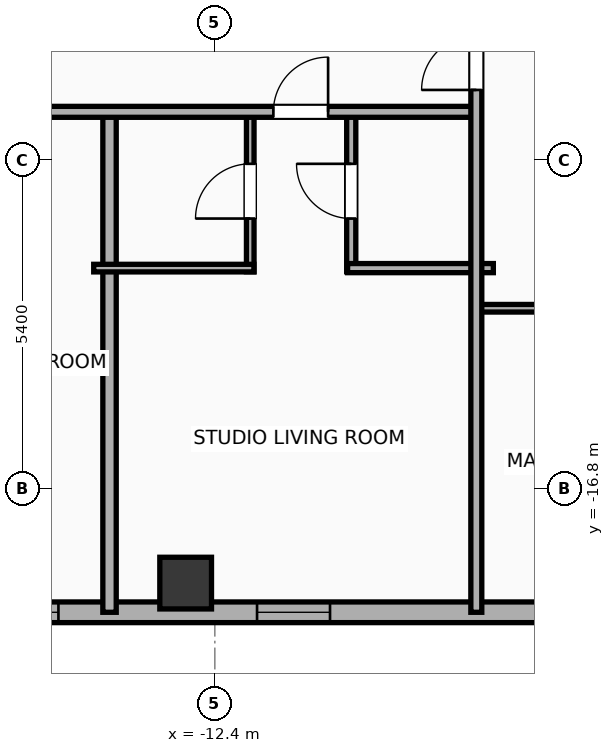
"""IFC4 building model, lengths in metres.
Left out: names, types, materials, properties, quantities, classifications, styles, units other than length and angle.
Written with IfcOpenShell. Run it as: python <this file> out.ifc"""

import sys

from ifc_helpers import new_model, si_unit, direction, frame, frame_2d, origin, origin_2d, place, context, subcontext, project, spatial, rectangle, hollow_rectangle, extrude, element, fill, save


model = new_model("IFC4")
c1 = context("Model", 3, precision=1e-05, world=origin(), true_north=direction((0.0, 1.0)))
c2 = subcontext(c1, "Body", "Model", "MODEL_VIEW")
j1 = project(units=[si_unit("LENGTHUNIT", "METRE"), si_unit("PLANEANGLEUNIT", "RADIAN")], contexts=[c1])
p1 = place(None, origin())
s1 = spatial("IfcSite", under=j1, at=p1, CompositionType="ELEMENT")
p2 = place(p1, origin())
s2 = spatial("IfcBuilding", under=s1, at=p2, CompositionType="ELEMENT")
p3 = place(p2, frame((0.0, 0.0, 247.0)))
s3 = spatial("IfcBuildingStorey", under=s2, at=p3, CompositionType="ELEMENT", Elevation=247.0)
p4 = place(p3, frame((-12.88, -18.35, 0.0), z_axis=(0.0, 0.0, 1.0), x_axis=(1.0, 0.0, 0.0)))
e1 = element("IfcColumn", 1, at=p4, inside=s3, PredefinedType="COLUMN", context=c2, shape_type="SweptSolid", body=[
    extrude(hollow_rectangle(XDim=0.85, YDim=0.85, WallThickness=0.028, at=origin_2d()), origin(), (0.0, 0.0, 1.0), 3.9),
])
p5 = place(p3, frame((26.783, -18.83, 0.0), z_axis=(0.0, 0.0, 1.0), x_axis=(-1.0, 0.0, 0.0)))
e2 = element("IfcWall", 2, at=p5, inside=s3, PredefinedType="ELEMENTEDWALL", context=c2, shape_type="SweptSolid", body=[
    extrude(rectangle(XDim=49.566, YDim=0.34, at=frame_2d((24.783, 0.0))), origin(), (0.0, 0.0, 1.0), 3.65),
])
p6 = place(p5, frame((23.583, 0.0, 0.75)))
e3 = element("IfcOpeningElement", 3, at=p6, cuts=e2, PredefinedType="OPENING", context=c2, shape_type="SweptSolid", body=[
    extrude(rectangle(XDim=2.4, YDim=2.1, at=frame_2d((1.2, 1.05))), frame((0.0, 0.18, 0.0), z_axis=(0.0, -1.0, 0.0), x_axis=(1.0, 0.0, 0.0)), (0.0, 0.0, 1.0), 0.36),
])
p7 = place(p5, frame((41.756, 0.0, 0.75)))
e4 = element("IfcOpeningElement", 4, at=p7, cuts=e2, PredefinedType="OPENING", context=c2, shape_type="SweptSolid", body=[
    extrude(rectangle(XDim=2.4, YDim=2.1, at=frame_2d((1.2, 1.05))), frame((0.0, 0.18, 0.0), z_axis=(0.0, -1.0, 0.0), x_axis=(1.0, 0.0, 0.0)), (0.0, 0.0, 1.0), 0.36),
])
p8 = place(p5, frame((47.222, 0.0, 0.75)))
e5 = element("IfcOpeningElement", 5, at=p8, cuts=e2, PredefinedType="OPENING", context=c2, shape_type="SweptSolid", body=[
    extrude(rectangle(XDim=1.2, YDim=2.05, at=frame_2d((0.6, 1.025))), frame((0.0, 0.18, 0.0), z_axis=(0.0, -1.0, 0.0), x_axis=(1.0, 0.0, 0.0)), (0.0, 0.0, 1.0), 0.36),
])
p9 = place(p5, frame((45.131, 0.0, 0.75)))
e6 = element("IfcOpeningElement", 6, at=p9, cuts=e2, PredefinedType="OPENING", context=c2, shape_type="SweptSolid", body=[
    extrude(rectangle(XDim=1.2, YDim=2.05, at=frame_2d((0.6, 1.025))), frame((0.0, 0.18, 0.0), z_axis=(0.0, -1.0, 0.0), x_axis=(1.0, 0.0, 0.0)), (0.0, 0.0, 1.0), 0.36),
])
p10 = place(p5, frame((37.289, 0.0, 0.75)))
e7 = element("IfcOpeningElement", 7, at=p10, cuts=e2, PredefinedType="OPENING", context=c2, shape_type="SweptSolid", body=[
    extrude(rectangle(XDim=1.2, YDim=2.05, at=frame_2d((0.6, 1.025))), frame((0.0, 0.18, 0.0), z_axis=(0.0, -1.0, 0.0), x_axis=(1.0, 0.0, 0.0)), (0.0, 0.0, 1.0), 0.36),
])
p11 = place(p5, frame((15.715, 0.0, 0.75)))
e8 = element("IfcOpeningElement", 8, at=p11, cuts=e2, PredefinedType="OPENING", context=c2, shape_type="SweptSolid", body=[
    extrude(rectangle(XDim=1.2, YDim=2.05, at=frame_2d((0.6, 1.025))), frame((0.0, 0.18, 0.0), z_axis=(0.0, -1.0, 0.0), x_axis=(1.0, 0.0, 0.0)), (0.0, 0.0, 1.0), 0.36),
])
p12 = place(p5, frame((12.022, 0.0, 0.75)))
e9 = element("IfcOpeningElement", 9, at=p12, cuts=e2, PredefinedType="OPENING", context=c2, shape_type="SweptSolid", body=[
    extrude(rectangle(XDim=1.2, YDim=2.05, at=frame_2d((0.6, 1.025))), frame((0.0, 0.18, 0.0), z_axis=(0.0, -1.0, 0.0), x_axis=(1.0, 0.0, 0.0)), (0.0, 0.0, 1.0), 0.36),
])
p13 = place(p5, frame((8.09, 0.0, 0.75)))
e10 = element("IfcOpeningElement", 10, at=p13, cuts=e2, PredefinedType="OPENING", context=c2, shape_type="SweptSolid", body=[
    extrude(rectangle(XDim=1.2, YDim=2.05, at=frame_2d((0.6, 1.025))), frame((0.0, 0.18, 0.0), z_axis=(0.0, -1.0, 0.0), x_axis=(1.0, 0.0, 0.0)), (0.0, 0.0, 1.0), 0.36),
])
p14 = place(p5, frame((4.637, 0.0, 0.75)))
e11 = element("IfcOpeningElement", 11, at=p14, cuts=e2, PredefinedType="OPENING", context=c2, shape_type="SweptSolid", body=[
    extrude(rectangle(XDim=1.2, YDim=2.05, at=frame_2d((0.6, 1.025))), frame((0.0, 0.18, 0.0), z_axis=(0.0, -1.0, 0.0), x_axis=(1.0, 0.0, 0.0)), (0.0, 0.0, 1.0), 0.36),
])
p15 = place(p5, frame((1.811, 0.0, 0.75)))
e12 = element("IfcOpeningElement", 12, at=p15, cuts=e2, PredefinedType="OPENING", context=c2, shape_type="SweptSolid", body=[
    extrude(rectangle(XDim=1.2, YDim=2.05, at=frame_2d((0.6, 1.025))), frame((0.0, 0.18, 0.0), z_axis=(0.0, -1.0, 0.0), x_axis=(1.0, 0.0, 0.0)), (0.0, 0.0, 1.0), 0.36),
])
p16 = place(p5, frame((32.253, 0.0, 0.75)))
e13 = element("IfcOpeningElement", 13, at=p16, cuts=e2, PredefinedType="OPENING", context=c2, shape_type="SweptSolid", body=[
    extrude(rectangle(XDim=1.2, YDim=2.05, at=frame_2d((0.6, 1.025))), frame((0.0, 0.18, 0.0), z_axis=(0.0, -1.0, 0.0), x_axis=(1.0, 0.0, 0.0)), (0.0, 0.0, 1.0), 0.36),
])
p17 = place(p5, frame((27.853, 0.0, 0.75)))
e14 = element("IfcOpeningElement", 14, at=p17, cuts=e2, PredefinedType="OPENING", context=c2, shape_type="SweptSolid", body=[
    extrude(rectangle(XDim=1.2, YDim=2.05, at=frame_2d((0.6, 1.025))), frame((0.0, 0.18, 0.0), z_axis=(0.0, -1.0, 0.0), x_axis=(1.0, 0.0, 0.0)), (0.0, 0.0, 1.0), 0.36),
])
p18 = place(p5, frame((20.473, 0.0, 0.75)))
e15 = element("IfcOpeningElement", 15, at=p18, cuts=e2, PredefinedType="OPENING", context=c2, shape_type="SweptSolid", body=[
    extrude(rectangle(XDim=1.2, YDim=2.05, at=frame_2d((0.6, 1.025))), frame((0.0, 0.18, 0.0), z_axis=(0.0, -1.0, 0.0), x_axis=(1.0, 0.0, 0.0)), (0.0, 0.0, 1.0), 0.36),
])
p19 = place(p3, frame((-14.132, -18.83, 0.0), z_axis=(0.0, 0.0, 1.0), x_axis=(0.0, 1.0, 0.0)))
e16 = element("IfcWall", 16, at=p19, inside=s3, PredefinedType="PARTITIONING", context=c2, shape_type="SweptSolid", body=[
    extrude(rectangle(XDim=8.31, YDim=0.22, at=frame_2d((4.155, 0.0))), origin(), (0.0, 0.0, 1.0), 3.65),
])
p20 = place(p3, frame((-11.818, -13.23, 0.0), z_axis=(0.0, 0.0, 1.0), x_axis=(0.0, 1.0, 0.0)))
e17 = element("IfcWall", 17, at=p20, inside=s3, PredefinedType="PARTITIONING", context=c2, shape_type="SweptSolid", body=[
    extrude(rectangle(XDim=2.65, YDim=0.125, at=frame_2d((1.325, 0.0))), origin(), (0.0, 0.0, 1.0), 3.65),
])
p21 = place(p20, frame((0.875, 0.0, 0.0)))
e18 = element("IfcOpeningElement", 18, at=p21, cuts=e17, PredefinedType="OPENING", context=c2, shape_type="SweptSolid", body=[
    extrude(rectangle(XDim=0.9, YDim=2.05, at=frame_2d((0.45, 1.025))), frame((0.0, 0.073, 0.0), z_axis=(0.0, -1.0, 0.0), x_axis=(1.0, 0.0, 0.0)), (0.0, 0.0, 1.0), 0.145),
])
p22 = place(p3, frame((-10.157, -13.23, 0.0), z_axis=(0.0, 0.0, 1.0), x_axis=(0.0, 1.0, 0.0)))
e19 = element("IfcWall", 19, at=p22, inside=s3, PredefinedType="PLUMBINGWALL", context=c2, shape_type="SweptSolid", body=[
    extrude(rectangle(XDim=2.65, YDim=0.15, at=frame_2d((1.325, 0.0))), origin(), (0.0, 0.0, 1.0), 3.65),
])
p23 = place(p22, frame((0.875, 0.0, 0.0)))
e20 = element("IfcOpeningElement", 20, at=p23, cuts=e19, PredefinedType="OPENING", context=c2, shape_type="SweptSolid", body=[
    extrude(rectangle(XDim=0.9, YDim=2.05, at=frame_2d((0.45, 1.025))), frame((0.0, 0.085, 0.0), z_axis=(0.0, -1.0, 0.0), x_axis=(1.0, 0.0, 0.0)), (0.0, 0.0, 1.0), 0.17),
])
p24 = place(p3, frame((-14.392, -13.17, 0.0), z_axis=(0.0, 0.0, 1.0), x_axis=(1.0, 0.0, 0.0)))
e21 = element("IfcWall", 21, at=p24, inside=s3, PredefinedType="PARTITIONING", context=c2, shape_type="SweptSolid", body=[
    extrude(rectangle(XDim=2.634, YDim=0.125, at=frame_2d((1.317, 0.0))), origin(), (0.0, 0.0, 1.0), 3.65),
])
p25 = place(p3, frame((-10.217, -13.17, 0.0), z_axis=(0.0, 0.0, 1.0), x_axis=(1.0, 0.0, 0.0)))
e22 = element("IfcWall", 22, at=p25, inside=s3, PredefinedType="PLUMBINGWALL", context=c2, shape_type="SweptSolid", body=[
    extrude(rectangle(XDim=2.397, YDim=0.15, at=frame_2d((1.198, 0.0))), origin(), (0.0, 0.0, 1.0), 3.65),
])
p26 = place(p3, frame((-26.23, -10.6, 0.0), z_axis=(0.0, 0.0, 1.0), x_axis=(1.0, 0.0, 0.0)))
e23 = element("IfcWall", 23, at=p26, inside=s3, PredefinedType="PARTITIONING", context=c2, shape_type="SweptSolid", body=[
    extrude(rectangle(XDim=18.15, YDim=0.18, at=frame_2d((9.075, 0.0))), origin(), (0.0, 0.0, 1.0), 3.65),
])
p27 = place(p26, frame((2.659, 0.0, 0.0)))
e24 = element("IfcOpeningElement", 24, at=p27, cuts=e23, PredefinedType="OPENING", context=c2, shape_type="SweptSolid", body=[
    extrude(rectangle(XDim=0.9, YDim=2.05, at=frame_2d((0.45, 1.025))), frame((0.0, 0.1, 0.0), z_axis=(0.0, -1.0, 0.0), x_axis=(1.0, 0.0, 0.0)), (0.0, 0.0, 1.0), 0.2),
])
p28 = place(p26, frame((9.703, 0.0, 0.0)))
e25 = element("IfcOpeningElement", 25, at=p28, cuts=e23, PredefinedType="OPENING", context=c2, shape_type="SweptSolid", body=[
    extrude(rectangle(XDim=1.15, YDim=2.05, at=frame_2d((0.575, 1.025))), frame((0.0, 0.1, 0.0), z_axis=(0.0, -1.0, 0.0), x_axis=(1.0, 0.0, 0.0)), (0.0, 0.0, 1.0), 0.2),
])
p29 = place(p26, frame((14.792, 0.0, 0.0)))
e26 = element("IfcOpeningElement", 26, at=p29, cuts=e23, PredefinedType="OPENING", context=c2, shape_type="SweptSolid", body=[
    extrude(rectangle(XDim=0.9, YDim=2.05, at=frame_2d((0.45, 1.025))), frame((0.0, 0.1, 0.0), z_axis=(0.0, -1.0, 0.0), x_axis=(1.0, 0.0, 0.0)), (0.0, 0.0, 1.0), 0.2),
])
p30 = place(p3, frame((-8.08, -13.83, 0.0), z_axis=(0.0, 0.0, 1.0), x_axis=(1.0, 0.0, 0.0)))
e27 = element("IfcWall", 27, at=p30, inside=s3, PredefinedType="PARTITIONING", context=c2, shape_type="SweptSolid", body=[
    extrude(rectangle(XDim=8.06, YDim=0.125, at=frame_2d((4.03, 0.0))), origin(), (0.0, 0.0, 1.0), 3.65),
])
p31 = place(p30, frame((1.323, 0.0, 0.0)))
e28 = element("IfcOpeningElement", 28, at=p31, cuts=e27, PredefinedType="OPENING", context=c2, shape_type="SweptSolid", body=[
    extrude(rectangle(XDim=0.9, YDim=2.05, at=frame_2d((0.45, 1.025))), frame((0.0, 0.073, 0.0), z_axis=(0.0, -1.0, 0.0), x_axis=(1.0, 0.0, 0.0)), (0.0, 0.0, 1.0), 0.145),
])
p32 = place(p30, frame((4.547, 0.0, 0.0)))
e29 = element("IfcOpeningElement", 29, at=p32, cuts=e27, PredefinedType="OPENING", context=c2, shape_type="SweptSolid", body=[
    extrude(rectangle(XDim=0.9, YDim=2.05, at=frame_2d((0.45, 1.025))), frame((0.0, 0.073, 0.0), z_axis=(0.0, -1.0, 0.0), x_axis=(1.0, 0.0, 0.0)), (0.0, 0.0, 1.0), 0.145),
])
p33 = place(p3, frame((-8.1, -18.83, 0.0), z_axis=(0.0, 0.0, 1.0), x_axis=(0.0, 1.0, 0.0)))
e30 = element("IfcWall", 30, at=p33, inside=s3, PredefinedType="PARTITIONING", context=c2, shape_type="SweptSolid", body=[
    extrude(rectangle(XDim=9.84, YDim=0.18, at=frame_2d((4.92, 0.0))), origin(), (0.0, 0.0, 1.0), 3.65),
])
p34 = place(p33, frame((8.59, 0.0, 0.0)))
e31 = element("IfcOpeningElement", 31, at=p34, cuts=e30, PredefinedType="OPENING", context=c2, shape_type="SweptSolid", body=[
    extrude(rectangle(XDim=0.9, YDim=2.05, at=frame_2d((0.45, 1.025))), frame((0.0, 0.1, 0.0), z_axis=(0.0, -1.0, 0.0), x_axis=(1.0, 0.0, 0.0)), (0.0, 0.0, 1.0), 0.2),
])
p35 = place(p7, origin())
e32 = element("IfcWindow", 32, at=p35, inside=s3, PartitioningType="SINGLE_PANEL", PredefinedType="WINDOW", context=c2, shape_type="SweptSolid", body=[
    extrude(rectangle(XDim=2.4, YDim=2.1, at=frame_2d((1.2, 1.05))), frame((0.0, 0.03, 0.0), z_axis=(0.0, -1.0, 0.0), x_axis=(1.0, 0.0, 0.0)), (0.0, 0.0, 1.0), 0.06),
])
fill(e4, e32)
p36 = place(p10, origin())
e33 = element("IfcWindow", 33, at=p36, inside=s3, PartitioningType="SINGLE_PANEL", PredefinedType="WINDOW", context=c2, shape_type="SweptSolid", body=[
    extrude(rectangle(XDim=1.2, YDim=2.05, at=frame_2d((0.6, 1.025))), frame((0.0, 0.03, 0.0), z_axis=(0.0, -1.0, 0.0), x_axis=(1.0, 0.0, 0.0)), (0.0, 0.0, 1.0), 0.06),
])
fill(e7, e33)
p37 = place(p21, origin())
e34 = element("IfcDoor", 34, at=p37, inside=s3, OperationType="SINGLE_SWING_LEFT", PredefinedType="DOOR", context=c2, shape_type="SweptSolid", body=[
    extrude(rectangle(XDim=0.9, YDim=2.05, at=frame_2d((0.45, 1.025))), frame((0.0, 0.025, 0.0), z_axis=(0.0, -1.0, 0.0), x_axis=(1.0, 0.0, 0.0)), (0.0, 0.0, 1.0), 0.05),
])
fill(e18, e34)
p38 = place(p23, origin())
e35 = element("IfcDoor", 35, at=p38, inside=s3, OperationType="SINGLE_SWING_RIGHT", PredefinedType="DOOR", context=c2, shape_type="SweptSolid", body=[
    extrude(rectangle(XDim=0.9, YDim=2.05, at=frame_2d((0.45, 1.025))), frame((0.0, 0.025, 0.0), z_axis=(0.0, -1.0, 0.0), x_axis=(1.0, 0.0, 0.0)), (0.0, 0.0, 1.0), 0.05),
])
fill(e20, e35)
p39 = place(p29, origin())
e36 = element("IfcDoor", 36, at=p39, inside=s3, OperationType="SINGLE_SWING_RIGHT", PredefinedType="DOOR", context=c2, shape_type="SweptSolid", body=[
    extrude(rectangle(XDim=0.9, YDim=2.05, at=frame_2d((0.45, 1.025))), frame((0.0, 0.025, 0.0), z_axis=(0.0, -1.0, 0.0), x_axis=(1.0, 0.0, 0.0)), (0.0, 0.0, 1.0), 0.05),
])
fill(e26, e36)
p40 = place(p34, origin())
e37 = element("IfcDoor", 37, at=p40, inside=s3, OperationType="SINGLE_SWING_LEFT", PredefinedType="DOOR", context=c2, shape_type="SweptSolid", body=[
    extrude(rectangle(XDim=0.9, YDim=2.05, at=frame_2d((0.45, 1.025))), frame((0.0, 0.025, 0.0), z_axis=(0.0, -1.0, 0.0), x_axis=(1.0, 0.0, 0.0)), (0.0, 0.0, 1.0), 0.05),
])
fill(e31, e37)
save(model, sys.argv[1])
